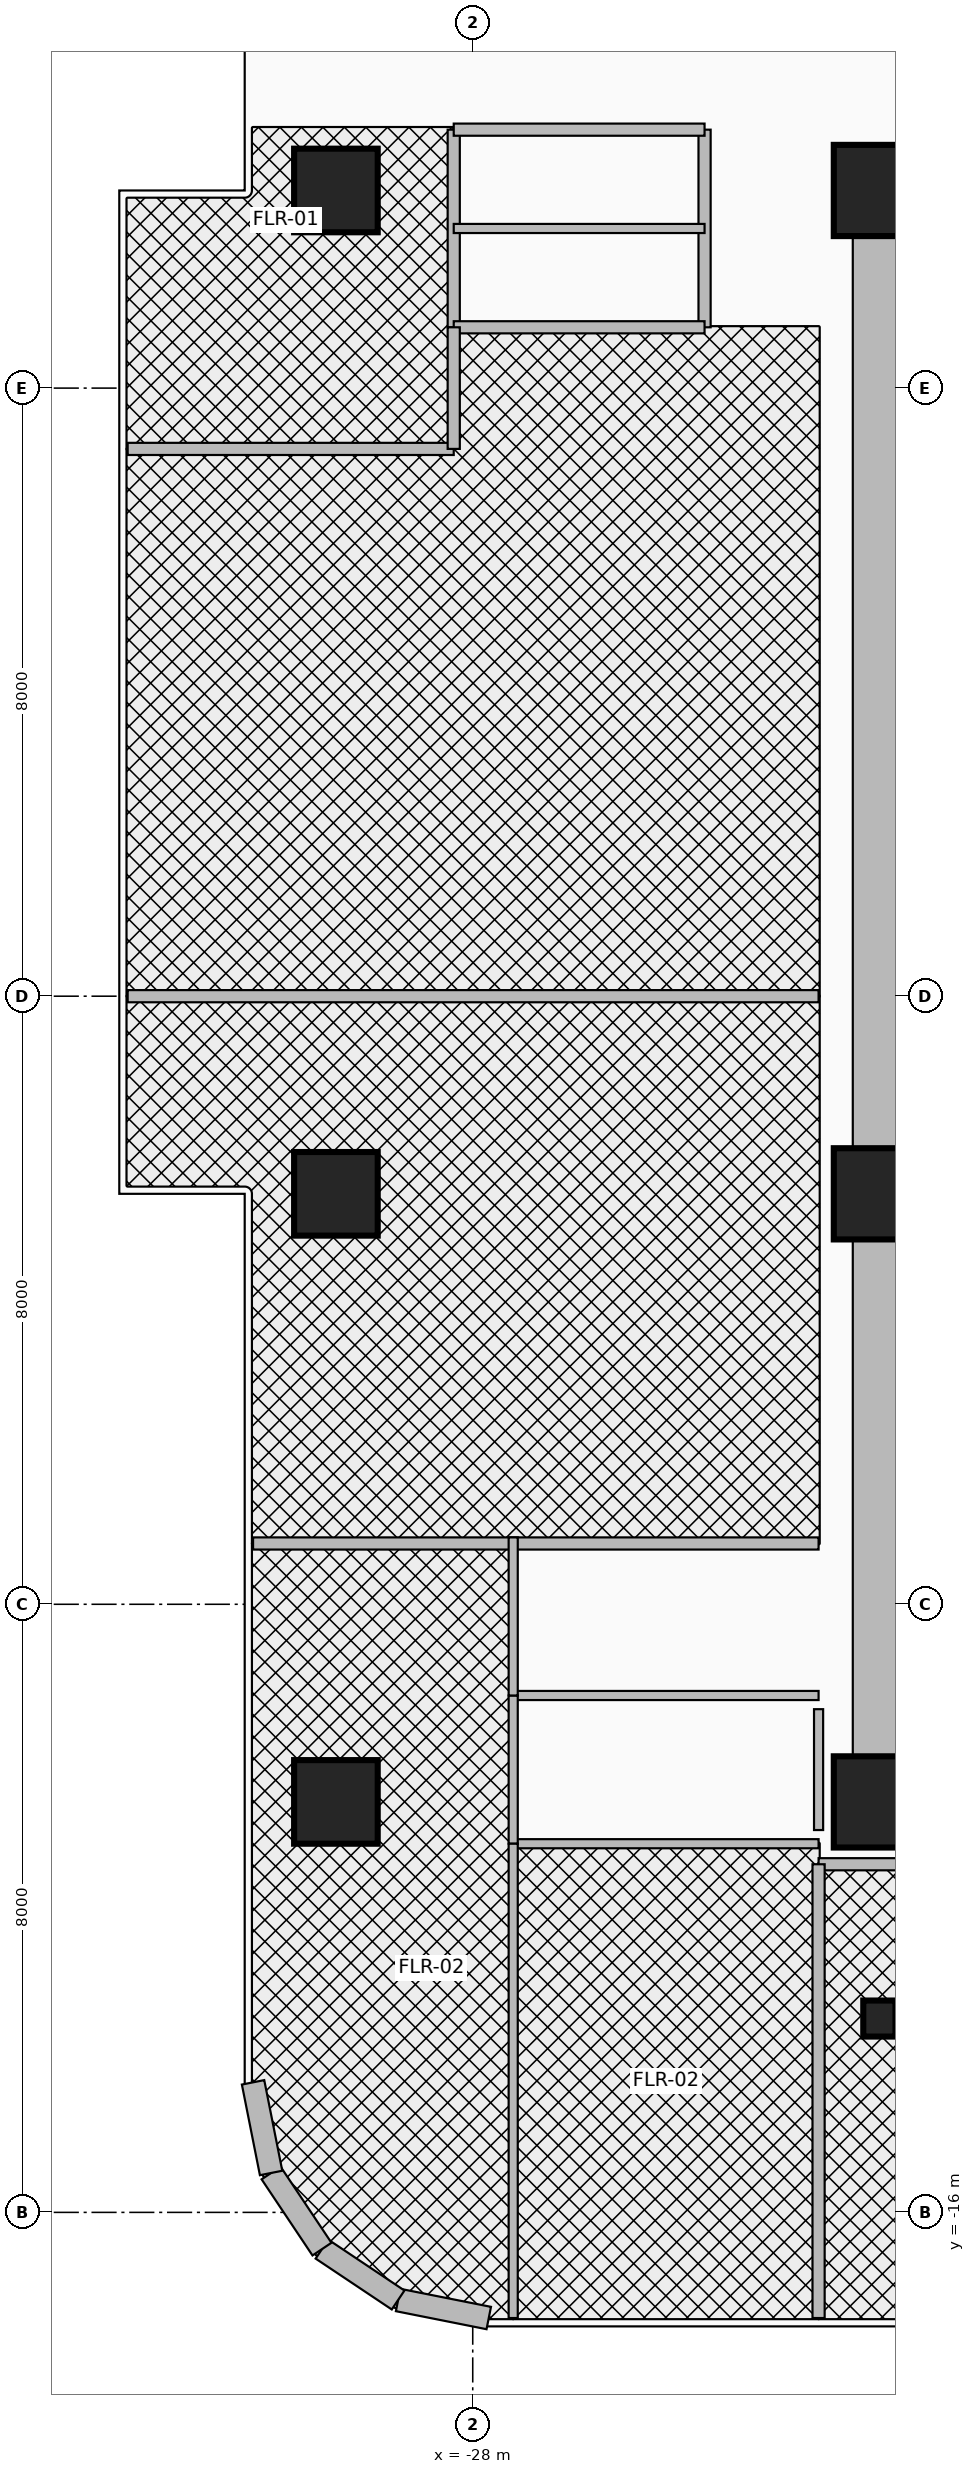
"""IFC4 building model, lengths in metres.
Left out: names, types, materials, properties, quantities, classifications, styles, units other than length and angle.
Written with IfcOpenShell. Run it as: python <this file> out.ifc"""

import sys

from ifc_helpers import new_model, si_unit, direction, frame, frame_2d, origin, origin_2d, place, context, subcontext, project, spatial, rectangle, circle, i_section, extrude, source, transform, mapped, element, fill, save


model = new_model("IFC4")
c1 = context("Model", 3, precision=1e-05, world=origin(), true_north=direction((0.0, 1.0)))
c2 = subcontext(c1, "Body", "Model", "MODEL_VIEW")
j1 = project(units=[si_unit("LENGTHUNIT", "METRE"), si_unit("PLANEANGLEUNIT", "RADIAN")], contexts=[c1])
p1 = place(None, origin())
s1 = spatial("IfcSite", under=j1, at=p1, CompositionType="ELEMENT")
p2 = place(p1, origin())
s2 = spatial("IfcBuilding", under=s1, at=p2, CompositionType="ELEMENT")
p3 = place(p2, frame((0.0, 0.0, 109.4)))
s3 = spatial("IfcBuildingStorey", under=s2, at=p3, CompositionType="ELEMENT", Elevation=109.4)
p4 = place(p3, frame((-22.65, -11.15, 0.0), z_axis=(0.0, 0.0, 1.0), x_axis=(0.0, 1.0, 0.0)))
e1 = element("IfcWall", 1, at=p4, inside=s3, PredefinedType="SHEAR", context=c2, shape_type="SweptSolid", body=[
    extrude(rectangle(XDim=22.3, YDim=0.7, at=frame_2d((11.15, 0.0))), origin(), (0.0, 0.0, 1.0), 3.46),
])
for number, where, z_axis, x_axis in (
    (2, (-22.65, 10.8, 0.0), (0.0, 0.0, 1.0), (1.0, 0.0, 0.0)),
    (3, (-22.65, -10.8, 0.0), (0.0, 0.0, 1.0), (1.0, 0.0, 0.0)),
):
    element("IfcWall", number, at=place(p3, frame(where, z_axis=z_axis, x_axis=x_axis)), inside=s3, PredefinedType="SHEAR", context=c2, shape_type="SweptSolid", body=[
        extrude(rectangle(XDim=10.25, YDim=0.7, at=frame_2d((5.125, 0.0))), origin(), (0.0, 0.0, 1.0), 3.46),
    ])
m1 = source(origin(), c2, "Body", "SweptSolid", [
    extrude(circle(Radius=0.55, at=origin_2d()), origin(), (0.0, 0.0, 1.0), 3.7),
])
p5 = place(p3, frame((-29.8, -10.6, 0.0), z_axis=(0.0, 0.0, 1.0), x_axis=(1.0, 0.0, 0.0)))
e4 = element("IfcColumn", 4, at=p5, inside=s3, PredefinedType="COLUMN", context=c2, shape_type="MappedRepresentation", body=[
    mapped(m1, transform((0.0, 0.0, 0.0), x_axis=(1.0, 0.0, 0.0), y_axis=(0.0, 1.0, 0.0), z_axis=(0.0, 0.0, 1.0), scale=1.0)),
])
m2 = source(origin(), c2, "Body", "SweptSolid", [
    extrude(rectangle(XDim=1.2, YDim=1.2, at=origin_2d()), origin(), (0.0, 0.0, 1.0), 3.7),
])
p6 = place(p3, frame((-22.65, -10.6, 0.0), z_axis=(0.0, 0.0, 1.0), x_axis=(1.0, 0.0, 0.0)))
e5 = element("IfcColumn", 5, at=p6, inside=s3, PredefinedType="COLUMN", context=c2, shape_type="MappedRepresentation", body=[
    mapped(m2, transform((0.0, 0.0, 0.0), x_axis=(1.0, 0.0, 0.0), y_axis=(0.0, 1.0, 0.0), z_axis=(0.0, 0.0, 1.0), scale=1.0)),
])
p7 = place(p3, frame((-29.8, -2.6, 0.0), z_axis=(0.0, 0.0, 1.0), x_axis=(1.0, 0.0, 0.0)))
e6 = element("IfcColumn", 6, at=p7, inside=s3, PredefinedType="COLUMN", context=c2, shape_type="MappedRepresentation", body=[
    mapped(m1, transform((0.0, 0.0, 0.0), x_axis=(1.0, 0.0, 0.0), y_axis=(0.0, 1.0, 0.0), z_axis=(0.0, 0.0, 1.0), scale=1.0)),
])
p8 = place(p3, frame((-22.65, -2.6, 0.0), z_axis=(0.0, 0.0, 1.0), x_axis=(1.0, 0.0, 0.0)))
e7 = element("IfcColumn", 7, at=p8, inside=s3, PredefinedType="COLUMN", context=c2, shape_type="MappedRepresentation", body=[
    mapped(m2, transform((0.0, 0.0, 0.0), x_axis=(1.0, 0.0, 0.0), y_axis=(0.0, 1.0, 0.0), z_axis=(0.0, 0.0, 1.0), scale=1.0)),
])
p9 = place(p3, frame((-29.8, 10.6, 0.0), z_axis=(0.0, 0.0, 1.0), x_axis=(1.0, 0.0, 0.0)))
e8 = element("IfcColumn", 8, at=p9, inside=s3, PredefinedType="COLUMN", context=c2, shape_type="MappedRepresentation", body=[
    mapped(m1, transform((0.0, 0.0, 0.0), x_axis=(1.0, 0.0, 0.0), y_axis=(0.0, 1.0, 0.0), z_axis=(0.0, 0.0, 1.0), scale=1.0)),
])
p10 = place(p3, frame((-22.65, 10.6, 0.0), z_axis=(0.0, 0.0, 1.0), x_axis=(1.0, 0.0, 0.0)))
e9 = element("IfcColumn", 9, at=p10, inside=s3, PredefinedType="COLUMN", context=c2, shape_type="MappedRepresentation", body=[
    mapped(m2, transform((0.0, 0.0, 0.0), x_axis=(1.0, 0.0, 0.0), y_axis=(0.0, 1.0, 0.0), z_axis=(0.0, 0.0, 1.0), scale=1.0)),
])
m3 = source(origin(), c2, "Body", "SweptSolid", [
    extrude(i_section(OverallWidth=0.424, OverallDepth=0.474, WebThickness=0.048, FlangeThickness=0.077, at=origin_2d()), origin(), (0.0, 0.0, 1.0), 3.7),
])
p11 = place(p3, frame((-22.65, -13.45, 0.0), z_axis=(0.0, 0.0, 1.0), x_axis=(1.0, 0.0, 0.0)))
e10 = element("IfcColumn", 10, at=p11, inside=s3, PredefinedType="COLUMN", context=c2, shape_type="MappedRepresentation", body=[
    mapped(m3, transform((0.0, 0.0, 0.0), x_axis=(1.0, 0.0, 0.0), y_axis=(0.0, 1.0, 0.0), z_axis=(0.0, 0.0, 1.0), scale=1.0)),
])
p12 = place(p3, frame((-27.789, -17.39, 0.0), z_axis=(0.0, 0.0, 1.0), x_axis=(-0.980804027463, 0.194996050505, 0.0)))
e11 = element("IfcWall", 11, at=p12, inside=s3, PredefinedType="SOLIDWALL", context=c2, shape_type="SweptSolid", body=[
    extrude(rectangle(XDim=1.216, YDim=0.3, at=frame_2d((0.608, 0.0))), origin(), (0.0, 0.0, 1.0), 3.46),
])
for number, where, z_axis, x_axis in (
    (12, (-28.982, -17.153, 0.0), (0.0, 0.0, 1.0), (-0.831, 0.556, 0.0)),
    (13, (-29.983, -16.483, 0.0), (0.0, 0.0, 1.0), (-0.556, 0.831, 0.0)),
):
    element("IfcWall", number, at=place(p3, frame(where, z_axis=z_axis, x_axis=x_axis)), inside=s3, PredefinedType="SOLIDWALL", context=c2, shape_type="SweptSolid", body=[
        extrude(rectangle(XDim=1.205, YDim=0.3, at=frame_2d((0.603, 0.0))), origin(), (0.0, 0.0, 1.0), 3.46),
    ])
p13 = place(p3, frame((-30.653, -15.482, 0.0), z_axis=(0.0, 0.0, 1.0), x_axis=(-0.194996050505, 0.980804027463, 0.0)))
e14 = element("IfcWall", 14, at=p13, inside=s3, PredefinedType="SOLIDWALL", context=c2, shape_type="SweptSolid", body=[
    extrude(rectangle(XDim=1.216, YDim=0.3, at=frame_2d((0.608, 0.0))), origin(), (0.0, 0.0, 1.0), 3.46),
])
p14 = place(p3, frame((-28.25, 8.8, 0.0), z_axis=(0.0, 0.0, 1.0), x_axis=(0.0, 1.0, 0.0)))
e15 = element("IfcWall", 15, at=p14, inside=s3, PredefinedType="PARTITIONING", context=c2, shape_type="SweptSolid", body=[
    extrude(rectangle(XDim=2.6, YDim=0.16, at=frame_2d((1.3, 0.0))), origin(), (0.0, 0.0, 1.0), 2.666),
])
p15 = place(p3, frame((-24.95, 8.8, 0.0), z_axis=(0.0, 0.0, 1.0), x_axis=(0.0, 1.0, 0.0)))
e16 = element("IfcWall", 16, at=p15, inside=s3, PredefinedType="PARTITIONING", context=c2, shape_type="SweptSolid", body=[
    extrude(rectangle(XDim=2.6, YDim=0.16, at=frame_2d((1.3, 0.0))), origin(), (0.0, 0.0, 1.0), 2.666),
])
p16 = place(p15, frame((0.3, 0.0, 0.0)))
e17 = element("IfcOpeningElement", 17, at=p16, cuts=e16, PredefinedType="OPENING", context=c2, shape_type="SweptSolid", body=[
    extrude(rectangle(XDim=0.85, YDim=2.1, at=frame_2d((0.425, 1.05))), frame((0.0, 0.095, 0.0), z_axis=(0.0, -1.0, 0.0), x_axis=(1.0, 0.0, 0.0)), (0.0, 0.0, 1.0), 0.19),
])
p17 = place(p15, frame((1.45, 0.0, 0.0)))
e18 = element("IfcOpeningElement", 18, at=p17, cuts=e16, PredefinedType="OPENING", context=c2, shape_type="SweptSolid", body=[
    extrude(rectangle(XDim=0.85, YDim=2.1, at=frame_2d((0.425, 1.05))), frame((0.0, 0.095, 0.0), z_axis=(0.0, -1.0, 0.0), x_axis=(1.0, 0.0, 0.0)), (0.0, 0.0, 1.0), 0.19),
])
for number, where, z_axis, x_axis in (
    (19, (-28.25, 8.8, 0.0), (0.0, 0.0, 1.0), (1.0, 0.0, 0.0)),
    (20, (-28.25, 11.4, 0.0), (0.0, 0.0, 1.0), (1.0, 0.0, 0.0)),
):
    element("IfcWall", number, at=place(p3, frame(where, z_axis=z_axis, x_axis=x_axis)), inside=s3, PredefinedType="PARTITIONING", context=c2, shape_type="SweptSolid", body=[
        extrude(rectangle(XDim=3.3, YDim=0.16, at=frame_2d((1.65, 0.0))), origin(), (0.0, 0.0, 1.0), 3.46),
    ])
p18 = place(p3, frame((-28.25, 10.1, 0.0), z_axis=(0.0, 0.0, 1.0), x_axis=(1.0, 0.0, 0.0)))
e21 = element("IfcWall", 21, at=p18, inside=s3, PredefinedType="PARTITIONING", context=c2, shape_type="SweptSolid", body=[
    extrude(rectangle(XDim=3.3, YDim=0.12, at=frame_2d((1.65, 0.0))), origin(), (0.0, 0.0, 1.0), 3.46),
])
p19 = place(p3, frame((-23.45, -11.42, 0.0), z_axis=(0.0, 0.0, 1.0), x_axis=(1.0, 0.0, 0.0)))
e22 = element("IfcWall", 22, at=p19, inside=s3, PredefinedType="PARTITIONING", context=c2, shape_type="SweptSolid", body=[
    extrude(rectangle(XDim=13.84, YDim=0.16, at=frame_2d((6.92, 0.0))), origin(), (0.0, 0.0, 1.0), 2.834),
])
p20 = place(p3, frame((-23.45, -17.39, 0.0), z_axis=(0.0, 0.0, 1.0), x_axis=(0.0, 1.0, 0.0)))
e23 = element("IfcWall", 23, at=p20, inside=s3, PredefinedType="PARTITIONING", context=c2, shape_type="SweptSolid", body=[
    extrude(rectangle(XDim=5.97, YDim=0.16, at=frame_2d((2.985, 0.0))), origin(), (0.0, 0.0, 1.0), 3.46),
])
p21 = place(p20, frame((2.535, 0.0, 0.0)))
e24 = element("IfcOpeningElement", 24, at=p21, cuts=e23, PredefinedType="OPENING", context=c2, shape_type="SweptSolid", body=[
    extrude(rectangle(XDim=0.9, YDim=2.1, at=frame_2d((0.45, 1.05))), frame((0.0, 0.095, 0.0), z_axis=(0.0, -1.0, 0.0), x_axis=(1.0, 0.0, 0.0)), (0.0, 0.0, 1.0), 0.19),
])
p22 = place(p3, frame((-30.89, -7.2, 0.0), z_axis=(0.0, 0.0, 1.0), x_axis=(1.0, 0.0, 0.0)))
e25 = element("IfcWall", 25, at=p22, inside=s3, PredefinedType="PARTITIONING", context=c2, shape_type="SweptSolid", body=[
    extrude(rectangle(XDim=7.44, YDim=0.16, at=frame_2d((3.72, 0.0))), origin(), (0.0, 0.0, 1.0), 2.896),
])
p23 = place(p22, frame((1.236, 0.0, 0.0)))
e26 = element("IfcOpeningElement", 26, at=p23, cuts=e25, PredefinedType="OPENING", context=c2, shape_type="SweptSolid", body=[
    extrude(rectangle(XDim=0.95, YDim=2.15, at=frame_2d((0.475, 1.075))), frame((0.0, 0.095, 0.0), z_axis=(0.0, -1.0, 0.0), x_axis=(1.0, 0.0, 0.0)), (0.0, 0.0, 1.0), 0.19),
])
p24 = place(p3, frame((-32.54, 7.2, 0.0), z_axis=(0.0, 0.0, 1.0), x_axis=(1.0, 0.0, 0.0)))
e27 = element("IfcWall", 27, at=p24, inside=s3, PredefinedType="PARTITIONING", context=c2, shape_type="SweptSolid", body=[
    extrude(rectangle(XDim=4.29, YDim=0.16, at=frame_2d((2.145, 0.0))), origin(), (0.0, 0.0, 1.0), 2.896),
])
p25 = place(p24, frame((1.695, 0.0, 0.0)))
e28 = element("IfcOpeningElement", 28, at=p25, cuts=e27, PredefinedType="OPENING", context=c2, shape_type="SweptSolid", body=[
    extrude(rectangle(XDim=0.9, YDim=2.1, at=frame_2d((0.45, 1.05))), frame((0.0, 0.095, 0.0), z_axis=(0.0, -1.0, 0.0), x_axis=(1.0, 0.0, 0.0)), (0.0, 0.0, 1.0), 0.19),
])
p26 = place(p3, frame((-28.25, 7.2, 0.0), z_axis=(0.0, 0.0, 1.0), x_axis=(0.0, 1.0, 0.0)))
e29 = element("IfcWall", 29, at=p26, inside=s3, PredefinedType="PARTITIONING", context=c2, shape_type="SweptSolid", body=[
    extrude(rectangle(XDim=1.6, YDim=0.16, at=frame_2d((0.8, 0.0))), origin(), (0.0, 0.0, 1.0), 2.988),
])
p27 = place(p3, frame((-27.468, -9.2, 0.0), z_axis=(0.0, 0.0, 1.0), x_axis=(1.0, 0.0, 0.0)))
e30 = element("IfcWall", 30, at=p27, inside=s3, PredefinedType="PARTITIONING", context=c2, shape_type="SweptSolid", body=[
    extrude(rectangle(XDim=4.018, YDim=0.12, at=frame_2d((2.009, 0.0))), origin(), (0.0, 0.0, 1.0), 2.988),
])
p28 = place(p3, frame((-27.468, -11.15, 0.0), z_axis=(0.0, 0.0, 1.0), x_axis=(1.0, 0.0, 0.0)))
e31 = element("IfcWall", 31, at=p28, inside=s3, PredefinedType="PARTITIONING", context=c2, shape_type="SweptSolid", body=[
    extrude(rectangle(XDim=4.018, YDim=0.12, at=frame_2d((2.009, 0.0))), origin(), (0.0, 0.0, 1.0), 3.46),
])
p29 = place(p3, frame((-27.468, -11.15, 0.0), z_axis=(0.0, 0.0, 1.0), x_axis=(0.0, 1.0, 0.0)))
e32 = element("IfcWall", 32, at=p29, inside=s3, PredefinedType="PARTITIONING", context=c2, shape_type="SweptSolid", body=[
    extrude(rectangle(XDim=1.95, YDim=0.12, at=frame_2d((0.975, 0.0))), origin(), (0.0, 0.0, 1.0), 2.666),
])
p30 = place(p29, frame((0.55, 0.0, 0.0)))
e33 = element("IfcOpeningElement", 33, at=p30, cuts=e32, PredefinedType="OPENING", context=c2, shape_type="SweptSolid", body=[
    extrude(rectangle(XDim=0.85, YDim=2.1, at=frame_2d((0.425, 1.05))), frame((0.0, 0.075, 0.0), z_axis=(0.0, -1.0, 0.0), x_axis=(1.0, 0.0, 0.0)), (0.0, 0.0, 1.0), 0.15),
])
p31 = place(p3, frame((-27.468, -9.2, 0.0), z_axis=(0.0, 0.0, 1.0), x_axis=(0.0, 1.0, 0.0)))
e34 = element("IfcWall", 34, at=p31, inside=s3, PredefinedType="PARTITIONING", context=c2, shape_type="SweptSolid", body=[
    extrude(rectangle(XDim=2.08, YDim=0.12, at=frame_2d((1.04, 0.0))), origin(), (0.0, 0.0, 1.0), 2.988),
])
p32 = place(p31, frame((0.55, 0.0, 0.0)))
e35 = element("IfcOpeningElement", 35, at=p32, cuts=e34, PredefinedType="OPENING", context=c2, shape_type="SweptSolid", body=[
    extrude(rectangle(XDim=0.9, YDim=2.1, at=frame_2d((0.45, 1.05))), frame((0.0, 0.075, 0.0), z_axis=(0.0, -1.0, 0.0), x_axis=(1.0, 0.0, 0.0)), (0.0, 0.0, 1.0), 0.15),
])
p33 = place(p3, frame((-27.468, -17.39, 0.0), z_axis=(0.0, 0.0, 1.0), x_axis=(0.0, 1.0, 0.0)))
e36 = element("IfcWall", 36, at=p33, inside=s3, PredefinedType="PARTITIONING", context=c2, shape_type="SweptSolid", body=[
    extrude(rectangle(XDim=6.24, YDim=0.12, at=frame_2d((3.12, 0.0))), origin(), (0.0, 0.0, 1.0), 3.46),
])
p34 = place(p33, frame((2.67, 0.0, 0.0)))
e37 = element("IfcOpeningElement", 37, at=p34, cuts=e36, PredefinedType="OPENING", context=c2, shape_type="SweptSolid", body=[
    extrude(rectangle(XDim=0.9, YDim=2.1, at=frame_2d((0.45, 1.05))), frame((0.0, 0.075, 0.0), z_axis=(0.0, -1.0, 0.0), x_axis=(1.0, 0.0, 0.0)), (0.0, 0.0, 1.0), 0.15),
])
p35 = place(p3, frame((-23.45, -10.97, 0.0), z_axis=(0.0, 0.0, 1.0), x_axis=(0.0, 1.0, 0.0)))
e38 = element("IfcWall", 38, at=p35, inside=s3, PredefinedType="PARTITIONING", context=c2, shape_type="SweptSolid", body=[
    extrude(rectangle(XDim=1.59, YDim=0.12, at=frame_2d((0.795, 0.0))), origin(), (0.0, 0.0, 1.0), 2.666),
])
p36 = place(p3, frame((-32.54, 0.0, 0.0), z_axis=(0.0, 0.0, 1.0), x_axis=(1.0, 0.0, 0.0)))
e39 = element("IfcWall", 39, at=p36, inside=s3, PredefinedType="PARTITIONING", context=c2, shape_type="SweptSolid", body=[
    extrude(rectangle(XDim=9.09, YDim=0.16, at=frame_2d((4.545, 0.0))), origin(), (0.0, 0.0, 1.0), 2.896),
])
p37 = place(p36, frame((3.2, 0.0, 0.0)))
e40 = element("IfcOpeningElement", 40, at=p37, cuts=e39, PredefinedType="OPENING", context=c2, shape_type="SweptSolid", body=[
    extrude(rectangle(XDim=1.8, YDim=2.15, at=frame_2d((0.9, 1.075))), frame((0.0, 0.095, 0.0), z_axis=(0.0, -1.0, 0.0), x_axis=(1.0, 0.0, 0.0)), (0.0, 0.0, 1.0), 0.19),
])
p38 = place(p16, origin())
e41 = element("IfcDoor", 41, at=p38, inside=s3, OperationType="SINGLE_SWING_RIGHT", PredefinedType="DOOR", context=c2, shape_type="SweptSolid", body=[
    extrude(rectangle(XDim=0.85, YDim=2.1, at=frame_2d((0.425, 1.05))), frame((0.0, 0.025, 0.0), z_axis=(0.0, -1.0, 0.0), x_axis=(1.0, 0.0, 0.0)), (0.0, 0.0, 1.0), 0.05),
])
fill(e17, e41)
p39 = place(p17, origin())
e42 = element("IfcDoor", 42, at=p39, inside=s3, OperationType="SINGLE_SWING_LEFT", PredefinedType="DOOR", context=c2, shape_type="SweptSolid", body=[
    extrude(rectangle(XDim=0.85, YDim=2.1, at=frame_2d((0.425, 1.05))), frame((0.0, 0.025, 0.0), z_axis=(0.0, -1.0, 0.0), x_axis=(1.0, 0.0, 0.0)), (0.0, 0.0, 1.0), 0.05),
])
fill(e18, e42)
p40 = place(p23, origin())
e43 = element("IfcDoor", 43, at=p40, inside=s3, OperationType="SINGLE_SWING_RIGHT", PredefinedType="DOOR", context=c2, shape_type="SweptSolid", body=[
    extrude(rectangle(XDim=0.95, YDim=2.15, at=frame_2d((0.475, 1.075))), frame((0.0, 0.025, 0.0), z_axis=(0.0, -1.0, 0.0), x_axis=(1.0, 0.0, 0.0)), (0.0, 0.0, 1.0), 0.05),
])
fill(e26, e43)
p41 = place(p30, origin())
e44 = element("IfcDoor", 44, at=p41, inside=s3, OperationType="SINGLE_SWING_LEFT", PredefinedType="DOOR", context=c2, shape_type="SweptSolid", body=[
    extrude(rectangle(XDim=0.85, YDim=2.1, at=frame_2d((0.425, 1.05))), frame((0.0, 0.025, 0.0), z_axis=(0.0, -1.0, 0.0), x_axis=(1.0, 0.0, 0.0)), (0.0, 0.0, 1.0), 0.05),
])
fill(e33, e44)
p42 = place(p32, origin())
e45 = element("IfcDoor", 45, at=p42, inside=s3, OperationType="SINGLE_SWING_RIGHT", PredefinedType="DOOR", context=c2, shape_type="SweptSolid", body=[
    extrude(rectangle(XDim=0.9, YDim=2.1, at=frame_2d((0.45, 1.05))), frame((0.0, 0.025, 0.0), z_axis=(0.0, -1.0, 0.0), x_axis=(1.0, 0.0, 0.0)), (0.0, 0.0, 1.0), 0.05),
])
fill(e35, e45)
p43 = place(p34, frame((0.9, 0.0, 0.0), z_axis=(0.0, 0.0, 1.0), x_axis=(-1.0, 0.0, 0.0)))
e46 = element("IfcDoor", 46, at=p43, inside=s3, OperationType="SINGLE_SWING_LEFT", PredefinedType="DOOR", context=c2, shape_type="SweptSolid", body=[
    extrude(rectangle(XDim=0.9, YDim=2.1, at=frame_2d((0.45, 1.05))), frame((0.0, 0.025, 0.0), z_axis=(0.0, -1.0, 0.0), x_axis=(1.0, 0.0, 0.0)), (0.0, 0.0, 1.0), 0.05),
])
fill(e37, e46)
p44 = place(p25, origin())
e47 = element("IfcDoor", 47, at=p44, inside=s3, OperationType="SINGLE_SWING_RIGHT", PredefinedType="DOOR", context=c2, shape_type="SweptSolid", body=[
    extrude(rectangle(XDim=0.9, YDim=2.1, at=frame_2d((0.45, 1.05))), frame((0.0, 0.025, 0.0), z_axis=(0.0, -1.0, 0.0), x_axis=(1.0, 0.0, 0.0)), (0.0, 0.0, 1.0), 0.05),
])
fill(e28, e47)
p45 = place(p37, frame((1.8, 0.0, 0.0), z_axis=(0.0, 0.0, 1.0), x_axis=(-1.0, 0.0, 0.0)))
e48 = element("IfcDoor", 48, at=p45, inside=s3, OperationType="DOUBLE_DOOR_SINGLE_SWING", PredefinedType="DOOR", context=c2, shape_type="SweptSolid", body=[
    extrude(rectangle(XDim=1.8, YDim=2.15, at=frame_2d((0.9, 1.075))), frame((0.0, 0.025, 0.0), z_axis=(0.0, -1.0, 0.0), x_axis=(1.0, 0.0, 0.0)), (0.0, 0.0, 1.0), 0.05),
])
fill(e40, e48)
p46 = place(p21, origin())
e49 = element("IfcDoor", 49, at=p46, inside=s3, OperationType="SINGLE_SWING_RIGHT", PredefinedType="DOOR", context=c2, shape_type="SweptSolid", body=[
    extrude(rectangle(XDim=0.9, YDim=2.1, at=frame_2d((0.45, 1.05))), frame((0.0, 0.025, 0.0), z_axis=(0.0, -1.0, 0.0), x_axis=(1.0, 0.0, 0.0)), (0.0, 0.0, 1.0), 0.05),
])
fill(e24, e49)
save(model, sys.argv[1])
